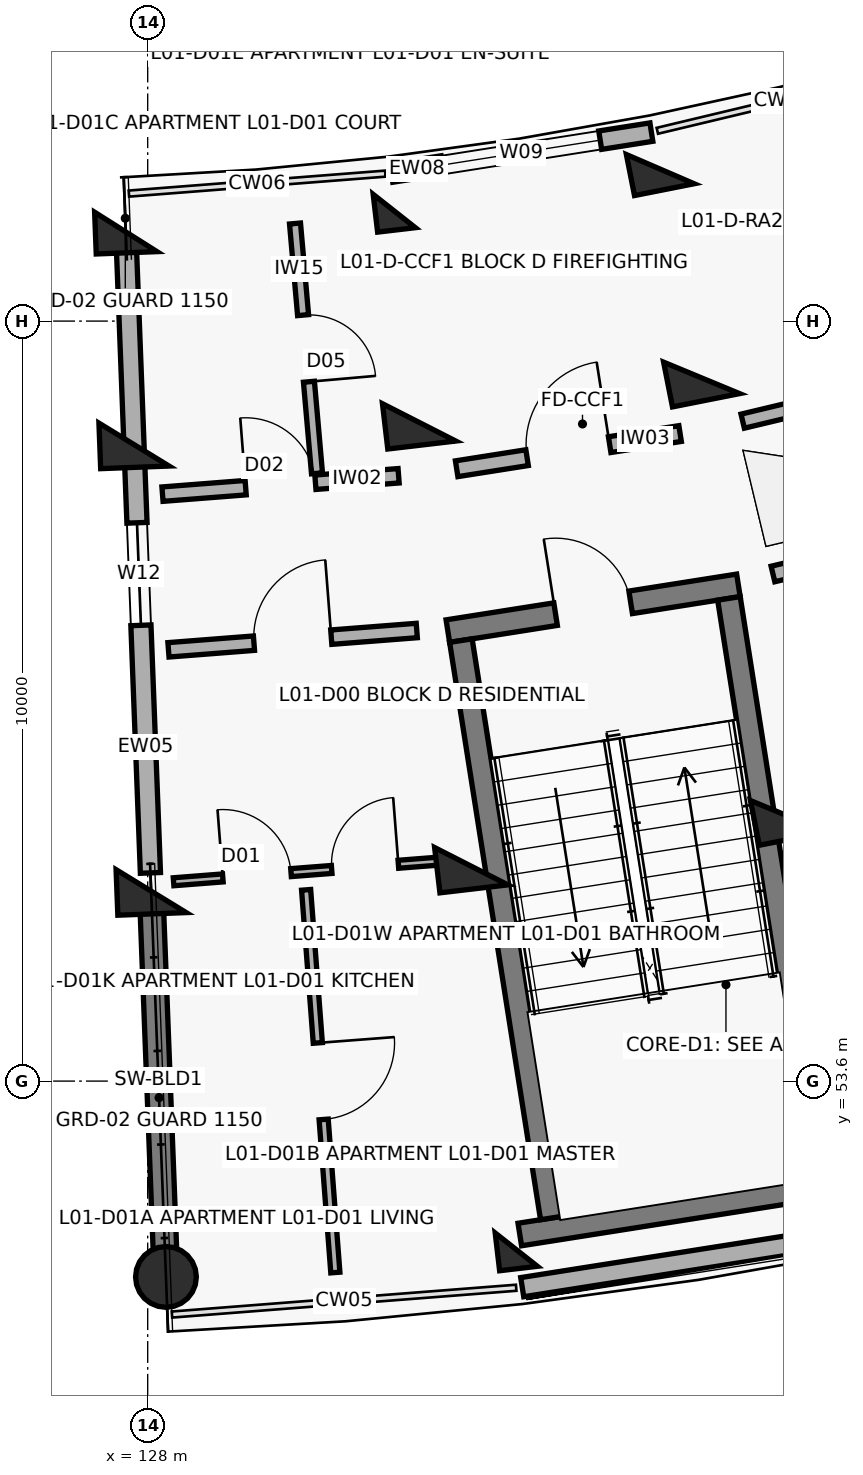
"""IFC4 building model, lengths in metres.
Left out: names, types, materials, properties, quantities, classifications, styles, units other than length and angle.
Written with IfcOpenShell. Run it as: python <this file> out.ifc"""

import sys

from ifc_helpers import new_model, si_unit, direction, frame, frame_2d, origin, origin_2d, place, context, subcontext, project, spatial, rectangle, circle, extrude, element, fill, save


model = new_model("IFC4")
c1 = context("Model", 3, precision=1e-05, world=origin(), true_north=direction((0.0, 1.0)))
c2 = subcontext(c1, "Body", "Model", "MODEL_VIEW")
j1 = project(units=[si_unit("LENGTHUNIT", "METRE"), si_unit("PLANEANGLEUNIT", "RADIAN")], contexts=[c1])
p1 = place(None, origin())
s1 = spatial("IfcSite", under=j1, at=p1, CompositionType="ELEMENT")
p2 = place(p1, origin())
s2 = spatial("IfcBuilding", under=s1, at=p2, CompositionType="ELEMENT")
p3 = place(p2, frame((0.0, 0.0, 4.5)))
s3 = spatial("IfcBuildingStorey", under=s2, at=p3, CompositionType="ELEMENT", Elevation=4.5)
p4 = place(p3, frame((127.712, 64.773, 0.0), z_axis=(0.0, 0.0, 1.0), x_axis=(0.038387809088, -0.999262916411, 0.0)))
e1 = element("IfcColumn", 1, at=p4, inside=s3, PredefinedType="COLUMN", context=c2, shape_type="SweptSolid", body=[
    extrude(rectangle(XDim=0.55, YDim=0.8, at=origin_2d()), origin(), (0.0, 0.0, 1.0), 3.6),
])
for number, where, z_axis, x_axis in (
    (2, (127.82, 61.975, 0.0), (0.0, 0.0, 1.0), (0.038, -0.999, 0.0)),
    (3, (128.045, 56.1, 0.0), (0.0, 0.0, 1.0), (0.038, -0.999, 0.0)),
):
    element("IfcColumn", number, at=place(p3, frame(where, z_axis=z_axis, x_axis=x_axis)), inside=s3, PredefinedType="COLUMN", context=c2, shape_type="SweptSolid", body=[
        extrude(rectangle(XDim=0.6, YDim=0.9, at=origin_2d()), origin(), (0.0, 0.0, 1.0), 3.6),
    ])
p5 = place(p3, frame((128.24, 51.023, 0.0), z_axis=(0.0, 0.0, 1.0), x_axis=(0.038387809088, -0.999262916411, 0.0)))
e4 = element("IfcColumn", 4, at=p5, inside=s3, PredefinedType="COLUMN", context=c2, shape_type="SweptSolid", body=[
    extrude(circle(Radius=0.4, at=origin_2d()), origin(), (0.0, 0.0, 1.0), 3.6),
])
p6 = place(p3, frame((131.244, 65.048, 0.0), z_axis=(0.0, 0.0, 1.0), x_axis=(0.116670737099, -0.993170649538, 0.0)))
e5 = element("IfcColumn", 5, at=p6, inside=s3, PredefinedType="COLUMN", context=c2, shape_type="SweptSolid", body=[
    extrude(rectangle(XDim=0.5, YDim=0.5, at=origin_2d()), origin(), (0.0, 0.0, 1.0), 3.6),
])
for number, where, z_axis, x_axis in (
    (6, (131.571, 62.267, 0.0), (0.0, 0.0, 1.0), (0.117, -0.993, 0.0)),
    (7, (132.257, 56.427, 0.0), (0.0, 0.0, 1.0), (0.117, -0.993, 0.0)),
):
    element("IfcColumn", number, at=place(p3, frame(where, z_axis=z_axis, x_axis=x_axis)), inside=s3, PredefinedType="COLUMN", context=c2, shape_type="SweptSolid", body=[
        extrude(rectangle(XDim=0.6, YDim=0.9, at=origin_2d()), origin(), (0.0, 0.0, 1.0), 3.6),
    ])
p7 = place(p3, frame((132.85, 51.382, 0.0), z_axis=(0.0, 0.0, 1.0), x_axis=(0.116670737099, -0.993170649538, 0.0)))
e8 = element("IfcColumn", 8, at=p7, inside=s3, PredefinedType="COLUMN", context=c2, shape_type="SweptSolid", body=[
    extrude(rectangle(XDim=0.5, YDim=0.5, at=origin_2d()), origin(), (0.0, 0.0, 1.0), 3.6),
])
p8 = place(p3, frame((134.744, 65.599, 0.0), z_axis=(0.0, 0.0, 1.0), x_axis=(0.19423435122, -0.980955155349, 0.0)))
e9 = element("IfcColumn", 9, at=p8, inside=s3, PredefinedType="COLUMN", context=c2, shape_type="SweptSolid", body=[
    extrude(rectangle(XDim=0.55, YDim=0.8, at=origin_2d()), origin(), (0.0, 0.0, 1.0), 3.6),
])
for number, where, z_axis, x_axis in (
    (10, (135.288, 62.853, 0.0), (0.0, 0.0, 1.0), (0.194, -0.981, 0.0)),
    (11, (136.43, 57.085, 0.0), (0.0, 0.0, 1.0), (0.194, -0.981, 0.0)),
):
    element("IfcColumn", number, at=place(p3, frame(where, z_axis=z_axis, x_axis=x_axis)), inside=s3, PredefinedType="COLUMN", context=c2, shape_type="SweptSolid", body=[
        extrude(rectangle(XDim=0.6, YDim=0.9, at=origin_2d()), origin(), (0.0, 0.0, 1.0), 3.6),
    ])
p9 = place(p3, frame((128.052, 55.92, 0.0), z_axis=(0.0, 0.0, 1.0), x_axis=(0.038381471406, -0.99926315986, 0.0)))
e12 = element("IfcWall", 12, at=p9, inside=s3, PredefinedType="SHEAR", context=c2, shape_type="SweptSolid", body=[
    extrude(rectangle(XDim=4.72, YDim=0.31, at=frame_2d((2.36, 0.0))), origin(), (0.0, 0.0, 1.0), 3.36),
])
p10 = place(p3, frame((132.928, 50.889, 0.0), z_axis=(0.0, 0.0, 1.0), x_axis=(0.987828826394, 0.155544880165, 0.0)))
e13 = element("IfcWall", 13, at=p10, inside=s3, PredefinedType="SOLIDWALL", context=c2, shape_type="SweptSolid", body=[
    extrude(rectangle(XDim=4.622, YDim=0.255, at=frame_2d((2.311, 0.0))), origin(), (0.0, 0.0, 1.0), 2.6),
])
p11 = place(p3, frame((131.206, 65.548, 0.0), z_axis=(0.0, 0.0, 1.0), x_axis=(0.987825183084, 0.155568016203, 0.0)))
e14 = element("IfcWall", 14, at=p11, inside=s3, PredefinedType="SOLIDWALL", context=c2, shape_type="SweptSolid", body=[
    extrude(rectangle(XDim=3.464, YDim=0.245, at=frame_2d((1.732, 0.0))), origin(), (0.0, 0.0, 1.0), 2.6),
])
p12 = place(p11, frame((0.682, 0.0, 0.32)))
e15 = element("IfcOpeningElement", 15, at=p12, cuts=e14, PredefinedType="OPENING", context=c2, shape_type="SweptSolid", body=[
    extrude(rectangle(XDim=2.1, YDim=1.65, at=frame_2d((1.05, 0.825))), frame((0.0, 0.133, 0.0), z_axis=(0.0, -1.0, 0.0), x_axis=(1.0, 0.0, 0.0)), (0.0, 0.0, 1.0), 0.265),
])
p13 = place(p3, frame((127.721, 64.533, 0.0), z_axis=(0.0, 0.0, 1.0), x_axis=(0.038407966241, -0.999262141847, 0.0)))
e16 = element("IfcWall", 16, at=p13, inside=s3, PredefinedType="SOLIDWALL", context=c2, shape_type="SweptSolid", body=[
    extrude(rectangle(XDim=8.2, YDim=0.265, at=frame_2d((4.1, 0.0))), origin(), (0.0, 0.0, 1.0), 2.58),
])
p14 = place(p13, frame((3.59, 0.0, 0.75)))
e17 = element("IfcOpeningElement", 17, at=p14, cuts=e16, PredefinedType="OPENING", context=c2, shape_type="SweptSolid", body=[
    extrude(rectangle(XDim=1.35, YDim=1.35, at=frame_2d((0.675, 0.675))), frame((0.0, 0.142, 0.0), z_axis=(0.0, -1.0, 0.0), x_axis=(1.0, 0.0, 0.0)), (0.0, 0.0, 1.0), 0.285),
])
p15 = place(p3, frame((131.949, 59.521, 0.0), z_axis=(0.0, 0.0, 1.0), x_axis=(0.98782579805, 0.155564111245, 0.0)))
e18 = element("IfcWall", 18, at=p15, inside=s3, PredefinedType="SHEAR", context=c2, shape_type="SweptSolid", body=[
    extrude(rectangle(XDim=3.87, YDim=0.3, at=frame_2d((1.935, 0.0))), origin(), (0.0, 0.0, 1.0), 3.6),
])
p16 = place(p15, frame((1.435, 0.0, 0.0)))
e19 = element("IfcOpeningElement", 19, at=p16, cuts=e18, PredefinedType="OPENING", context=c2, shape_type="SweptSolid", body=[
    extrude(rectangle(XDim=1.0, YDim=2.15, at=frame_2d((0.5, 1.075))), frame((0.0, 0.16, 0.0), z_axis=(0.0, -1.0, 0.0), x_axis=(1.0, 0.0, 0.0)), (0.0, 0.0, 1.0), 0.32),
])
p17 = place(p3, frame((132.896, 51.581, 0.0), z_axis=(0.0, 0.0, 1.0), x_axis=(0.987819142769, 0.155606366126, 0.0)))
e20 = element("IfcWall", 20, at=p17, inside=s3, PredefinedType="SHEAR", context=c2, shape_type="SweptSolid", body=[
    extrude(rectangle(XDim=4.47, YDim=0.3, at=frame_2d((2.235, 0.0))), origin(), (0.0, 0.0, 1.0), 3.6),
])
p18 = place(p3, frame((132.121, 59.396, 0.0), z_axis=(0.0, 0.0, 1.0), x_axis=(0.155563141844, -0.987825950712, 0.0)))
e21 = element("IfcWall", 21, at=p18, inside=s3, PredefinedType="SHEAR", context=c2, shape_type="SweptSolid", body=[
    extrude(rectangle(XDim=7.69, YDim=0.3, at=frame_2d((3.845, 0.0))), origin(), (0.0, 0.0, 1.0), 3.6),
])
p19 = place(p3, frame((135.647, 59.951, 0.0), z_axis=(0.0, 0.0, 1.0), x_axis=(0.155568020624, -0.987825182388, 0.0)))
e22 = element("IfcWall", 22, at=p19, inside=s3, PredefinedType="SHEAR", context=c2, shape_type="SweptSolid", body=[
    extrude(rectangle(XDim=7.69, YDim=0.3, at=frame_2d((3.845, 0.0))), origin(), (0.0, 0.0, 1.0), 3.6),
])
p20 = place(p3, frame((128.273, 59.274, 0.0), z_axis=(0.0, 0.0, 1.0), x_axis=(0.996982624396, 0.077625038827, 0.0)))
e23 = element("IfcWall", 23, at=p20, inside=s3, PredefinedType="SOLIDWALL", context=c2, shape_type="SweptSolid", body=[
    extrude(rectangle(XDim=3.277, YDim=0.19, at=frame_2d((1.639, 0.0))), origin(), (0.0, 0.0, 1.0), 2.58),
])
p21 = place(p20, frame((1.128, 0.0, 0.0)))
e24 = element("IfcOpeningElement", 24, at=p21, cuts=e23, PredefinedType="OPENING", context=c2, shape_type="SweptSolid", body=[
    extrude(rectangle(XDim=1.02, YDim=2.15, at=frame_2d((0.51, 1.075))), frame((0.0, 0.105, 0.0), z_axis=(0.0, -1.0, 0.0), x_axis=(1.0, 0.0, 0.0)), (0.0, 0.0, 1.0), 0.21),
])
p22 = place(p3, frame((128.195, 61.323, 0.0), z_axis=(0.0, 0.0, 1.0), x_axis=(0.996987280187, 0.077565218655, 0.0)))
e25 = element("IfcWall", 25, at=p22, inside=s3, PredefinedType="SOLIDWALL", context=c2, shape_type="SweptSolid", body=[
    extrude(rectangle(XDim=3.116, YDim=0.19, at=frame_2d((1.558, 0.0))), origin(), (0.0, 0.0, 1.0), 2.58),
])
p23 = place(p22, frame((1.098, 0.0, 0.0)))
e26 = element("IfcOpeningElement", 26, at=p23, cuts=e25, PredefinedType="OPENING", context=c2, shape_type="SweptSolid", body=[
    extrude(rectangle(XDim=0.92, YDim=2.1, at=frame_2d((0.46, 1.05))), frame((0.0, 0.105, 0.0), z_axis=(0.0, -1.0, 0.0), x_axis=(1.0, 0.0, 0.0)), (0.0, 0.0, 1.0), 0.21),
])
p24 = place(p3, frame((129.938, 64.884, 0.0), z_axis=(0.0, 0.0, 1.0), x_axis=(0.087667103282, -0.996149827587, 0.0)))
e27 = element("IfcWall", 27, at=p24, inside=s3, PredefinedType="PARTITIONING", context=c2, shape_type="SweptSolid", body=[
    extrude(rectangle(XDim=3.3, YDim=0.145, at=frame_2d((1.65, 0.0))), origin(), (0.0, 0.0, 1.0), 2.58),
])
p25 = place(p24, frame((1.21, 0.0, 0.0)))
e28 = element("IfcOpeningElement", 28, at=p25, cuts=e27, PredefinedType="OPENING", context=c2, shape_type="SweptSolid", body=[
    extrude(rectangle(XDim=0.88, YDim=2.1, at=frame_2d((0.44, 1.05))), frame((0.0, 0.083, 0.0), z_axis=(0.0, -1.0, 0.0), x_axis=(1.0, 0.0, 0.0)), (0.0, 0.0, 1.0), 0.165),
])
p26 = place(p3, frame((128.341, 56.223, 0.0), z_axis=(0.0, 0.0, 1.0), x_axis=(0.996986990942, 0.077568936389, 0.0)))
e29 = element("IfcWall", 29, at=p26, inside=s3, PredefinedType="PARTITIONING", context=c2, shape_type="SweptSolid", body=[
    extrude(rectangle(XDim=3.616, YDim=0.105, at=frame_2d((1.808, 0.0))), origin(), (0.0, 0.0, 1.0), 2.58),
])
p27 = place(p26, frame((0.65, 0.0, 0.0)))
e30 = element("IfcOpeningElement", 30, at=p27, cuts=e29, PredefinedType="OPENING", context=c2, shape_type="SweptSolid", body=[
    extrude(rectangle(XDim=0.9, YDim=2.1, at=frame_2d((0.45, 1.05))), frame((0.0, 0.062, 0.0), z_axis=(0.0, -1.0, 0.0), x_axis=(1.0, 0.0, 0.0)), (0.0, 0.0, 1.0), 0.125),
])
p28 = place(p26, frame((2.086, 0.0, 0.0)))
e31 = element("IfcOpeningElement", 31, at=p28, cuts=e29, PredefinedType="OPENING", context=c2, shape_type="SweptSolid", body=[
    extrude(rectangle(XDim=0.88, YDim=2.1, at=frame_2d((0.44, 1.05))), frame((0.0, 0.062, 0.0), z_axis=(0.0, -1.0, 0.0), x_axis=(1.0, 0.0, 0.0)), (0.0, 0.0, 1.0), 0.125),
])
p29 = place(p3, frame((130.084, 56.116, 0.0), z_axis=(0.0, 0.0, 1.0), x_axis=(0.076141951799, -0.997096987848, 0.0)))
e32 = element("IfcWall", 32, at=p29, inside=s3, PredefinedType="PARTITIONING", context=c2, shape_type="SweptSolid", body=[
    extrude(rectangle(XDim=5.05, YDim=0.12, at=frame_2d((2.525, 0.0))), origin(), (0.0, 0.0, 1.0), 2.58),
])
p30 = place(p29, frame((2.02, 0.0, 0.0)))
e33 = element("IfcOpeningElement", 33, at=p30, cuts=e32, PredefinedType="OPENING", context=c2, shape_type="SweptSolid", body=[
    extrude(rectangle(XDim=1.01, YDim=2.1, at=frame_2d((0.505, 1.05))), frame((0.0, 0.07, 0.0), z_axis=(0.0, -1.0, 0.0), x_axis=(1.0, 0.0, 0.0)), (0.0, 0.0, 1.0), 0.14),
])
p31 = place(p3, frame((132.065, 61.657, 0.0), z_axis=(0.0, 0.0, 1.0), x_axis=(0.987816121487, 0.155625544594, 0.0)))
e34 = element("IfcWall", 34, at=p31, inside=s3, PredefinedType="SOLIDWALL", context=c2, shape_type="SweptSolid", body=[
    extrude(rectangle(XDim=2.976, YDim=0.21, at=frame_2d((1.488, 0.0))), origin(), (0.0, 0.0, 1.0), 2.58),
])
p32 = place(p31, frame((0.938, 0.0, 0.0)))
e35 = element("IfcOpeningElement", 35, at=p32, cuts=e34, PredefinedType="OPENING", context=c2, shape_type="SweptSolid", body=[
    extrude(rectangle(XDim=1.1, YDim=2.15, at=frame_2d((0.55, 1.075))), frame((0.0, 0.115, 0.0), z_axis=(0.0, -1.0, 0.0), x_axis=(1.0, 0.0, 0.0)), (0.0, 0.0, 1.0), 0.23),
])
p33 = place(p3, frame((136.227, 60.272, 0.0), z_axis=(0.0, 0.0, 1.0), x_axis=(0.972564346632, 0.232634029456, 0.0)))
e36 = element("IfcWall", 36, at=p33, inside=s3, PredefinedType="SOLIDWALL", context=c2, shape_type="SweptSolid", body=[
    extrude(rectangle(XDim=3.137, YDim=0.21, at=frame_2d((1.568, 0.0))), origin(), (0.0, 0.0, 1.0), 2.58),
])
p34 = place(p33, frame((0.45, 0.0, 0.0)))
e37 = element("IfcOpeningElement", 37, at=p34, cuts=e36, PredefinedType="OPENING", context=c2, shape_type="SweptSolid", body=[
    extrude(rectangle(XDim=1.1, YDim=2.15, at=frame_2d((0.55, 1.075))), frame((0.0, 0.115, 0.0), z_axis=(0.0, -1.0, 0.0), x_axis=(1.0, 0.0, 0.0)), (0.0, 0.0, 1.0), 0.23),
])
p35 = place(p33, frame((1.567, 0.0, 0.0)))
e38 = element("IfcOpeningElement", 38, at=p35, cuts=e36, PredefinedType="OPENING", context=c2, shape_type="SweptSolid", body=[
    extrude(rectangle(XDim=1.12, YDim=2.15, at=frame_2d((0.56, 1.075))), frame((0.0, 0.115, 0.0), z_axis=(0.0, -1.0, 0.0), x_axis=(1.0, 0.0, 0.0)), (0.0, 0.0, 1.0), 0.23),
])
p36 = place(p3, frame((135.828, 62.283, 0.0), z_axis=(0.0, 0.0, 1.0), x_axis=(0.972558314217, 0.232659247501, 0.0)))
e39 = element("IfcWall", 39, at=p36, inside=s3, PredefinedType="SOLIDWALL", context=c2, shape_type="SweptSolid", body=[
    extrude(rectangle(XDim=2.976, YDim=0.19, at=frame_2d((1.488, 0.0))), origin(), (0.0, 0.0, 1.0), 2.58),
])
p37 = place(p36, frame((0.928, 0.0, 0.0)))
e40 = element("IfcOpeningElement", 40, at=p37, cuts=e39, PredefinedType="OPENING", context=c2, shape_type="SweptSolid", body=[
    extrude(rectangle(XDim=1.12, YDim=2.15, at=frame_2d((0.56, 1.075))), frame((0.0, 0.105, 0.0), z_axis=(0.0, -1.0, 0.0), x_axis=(1.0, 0.0, 0.0)), (0.0, 0.0, 1.0), 0.21),
])
p38 = place(p12, origin())
e41 = element("IfcWindow", 41, at=p38, inside=s3, PartitioningType="TRIPLE_PANEL_VERTICAL", PredefinedType="WINDOW", context=c2, shape_type="SweptSolid", body=[
    extrude(rectangle(XDim=2.1, YDim=1.65, at=frame_2d((1.05, 0.825))), frame((0.0, 0.03, 0.0), z_axis=(0.0, -1.0, 0.0), x_axis=(1.0, 0.0, 0.0)), (0.0, 0.0, 1.0), 0.06),
])
fill(e15, e41)
p39 = place(p14, origin())
e42 = element("IfcWindow", 42, at=p39, inside=s3, PartitioningType="DOUBLE_PANEL_VERTICAL", PredefinedType="WINDOW", context=c2, shape_type="SweptSolid", body=[
    extrude(rectangle(XDim=1.35, YDim=1.35, at=frame_2d((0.675, 0.675))), frame((0.0, 0.03, 0.0), z_axis=(0.0, -1.0, 0.0), x_axis=(1.0, 0.0, 0.0)), (0.0, 0.0, 1.0), 0.06),
])
fill(e17, e42)
p40 = place(p16, origin())
e43 = element("IfcDoor", 43, at=p40, inside=s3, OperationType="SINGLE_SWING_LEFT", PredefinedType="DOOR", context=c2, shape_type="SweptSolid", body=[
    extrude(rectangle(XDim=1.0, YDim=2.15, at=frame_2d((0.5, 1.075))), frame((0.0, 0.025, 0.0), z_axis=(0.0, -1.0, 0.0), x_axis=(1.0, 0.0, 0.0)), (0.0, 0.0, 1.0), 0.05),
])
fill(e19, e43)
p41 = place(p21, origin())
e44 = element("IfcDoor", 44, at=p41, inside=s3, OperationType="SINGLE_SWING_RIGHT", PredefinedType="DOOR", context=c2, shape_type="SweptSolid", body=[
    extrude(rectangle(XDim=1.02, YDim=2.15, at=frame_2d((0.51, 1.075))), frame((0.0, 0.025, 0.0), z_axis=(0.0, -1.0, 0.0), x_axis=(1.0, 0.0, 0.0)), (0.0, 0.0, 1.0), 0.05),
])
fill(e24, e44)
p42 = place(p23, origin())
e45 = element("IfcDoor", 45, at=p42, inside=s3, OperationType="SINGLE_SWING_LEFT", PredefinedType="DOOR", context=c2, shape_type="SweptSolid", body=[
    extrude(rectangle(XDim=0.92, YDim=2.1, at=frame_2d((0.46, 1.05))), frame((0.0, 0.025, 0.0), z_axis=(0.0, -1.0, 0.0), x_axis=(1.0, 0.0, 0.0)), (0.0, 0.0, 1.0), 0.05),
])
fill(e26, e45)
p43 = place(p25, origin())
e46 = element("IfcDoor", 46, at=p43, inside=s3, OperationType="SINGLE_SWING_RIGHT", PredefinedType="DOOR", context=c2, shape_type="SweptSolid", body=[
    extrude(rectangle(XDim=0.88, YDim=2.1, at=frame_2d((0.44, 1.05))), frame((0.0, 0.025, 0.0), z_axis=(0.0, -1.0, 0.0), x_axis=(1.0, 0.0, 0.0)), (0.0, 0.0, 1.0), 0.05),
])
fill(e28, e46)
p44 = place(p27, origin())
e47 = element("IfcDoor", 47, at=p44, inside=s3, OperationType="SINGLE_SWING_LEFT", PredefinedType="DOOR", context=c2, shape_type="SweptSolid", body=[
    extrude(rectangle(XDim=0.9, YDim=2.1, at=frame_2d((0.45, 1.05))), frame((0.0, 0.025, 0.0), z_axis=(0.0, -1.0, 0.0), x_axis=(1.0, 0.0, 0.0)), (0.0, 0.0, 1.0), 0.05),
])
fill(e30, e47)
p45 = place(p28, origin())
e48 = element("IfcDoor", 48, at=p45, inside=s3, OperationType="SINGLE_SWING_RIGHT", PredefinedType="DOOR", context=c2, shape_type="SweptSolid", body=[
    extrude(rectangle(XDim=0.88, YDim=2.1, at=frame_2d((0.44, 1.05))), frame((0.0, 0.025, 0.0), z_axis=(0.0, -1.0, 0.0), x_axis=(1.0, 0.0, 0.0)), (0.0, 0.0, 1.0), 0.05),
])
fill(e31, e48)
p46 = place(p30, origin())
e49 = element("IfcDoor", 49, at=p46, inside=s3, OperationType="SINGLE_SWING_LEFT", PredefinedType="DOOR", context=c2, shape_type="SweptSolid", body=[
    extrude(rectangle(XDim=1.01, YDim=2.1, at=frame_2d((0.505, 1.05))), frame((0.0, 0.025, 0.0), z_axis=(0.0, -1.0, 0.0), x_axis=(1.0, 0.0, 0.0)), (0.0, 0.0, 1.0), 0.05),
])
fill(e33, e49)
p47 = place(p32, origin())
e50 = element("IfcDoor", 50, at=p47, inside=s3, OperationType="SINGLE_SWING_RIGHT", PredefinedType="DOOR", context=c2, shape_type="SweptSolid", body=[
    extrude(rectangle(XDim=1.1, YDim=2.15, at=frame_2d((0.55, 1.075))), frame((0.0, 0.025, 0.0), z_axis=(0.0, -1.0, 0.0), x_axis=(1.0, 0.0, 0.0)), (0.0, 0.0, 1.0), 0.05),
])
fill(e35, e50)
save(model, sys.argv[1])
